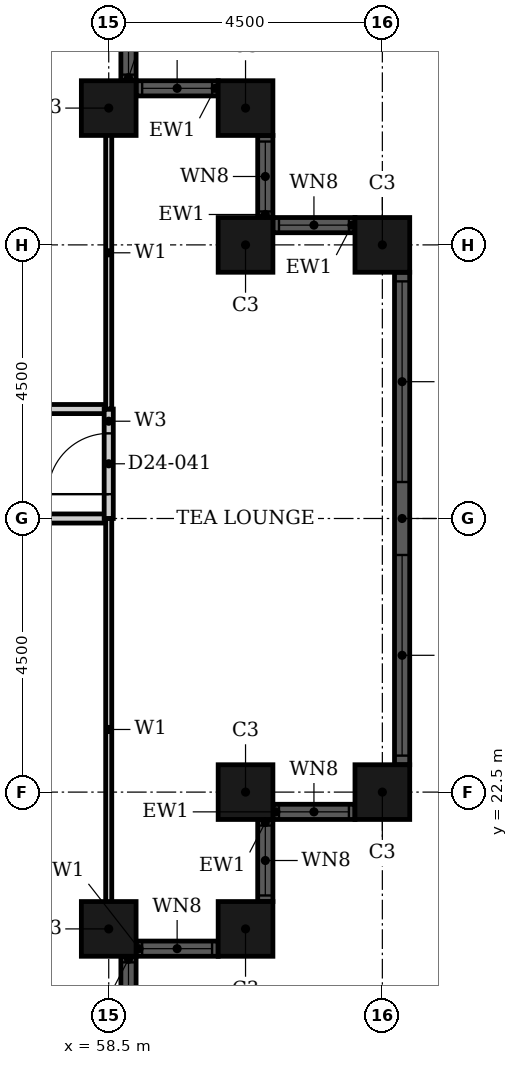
"""IFC4 building model, lengths in metres.
Left out: names, types, materials, properties, quantities, classifications, styles, units other than length and angle.
Written with IfcOpenShell. Run it as: python <this file> out.ifc"""

import sys

from ifc_helpers import new_model, si_unit, direction, frame, frame_2d, origin, origin_2d, place, context, subcontext, project, spatial, rectangle, hollow_rectangle, extrude, element, fill, save


model = new_model("IFC4")
c1 = context("Model", 3, precision=1e-05, world=origin(), true_north=direction((0.0, 1.0)))
c2 = subcontext(c1, "Body", "Model", "MODEL_VIEW")
j1 = project(units=[si_unit("LENGTHUNIT", "METRE"), si_unit("PLANEANGLEUNIT", "RADIAN")], contexts=[c1])
p1 = place(None, origin())
s1 = spatial("IfcSite", under=j1, at=p1, CompositionType="ELEMENT")
p2 = place(p1, origin())
s2 = spatial("IfcBuilding", under=s1, at=p2, CompositionType="ELEMENT")
p3 = place(p2, frame((0.0, 0.0, 100.8)))
s3 = spatial("IfcBuildingStorey", under=s2, at=p3, CompositionType="ELEMENT", Elevation=100.8)
for number, where, z_axis, x_axis in (
    (1, (58.5, 20.25, 0.0), (0.0, 0.0, 1.0), (1.0, 0.0, 0.0)),
    (2, (60.75, 20.25, 0.0), (0.0, 0.0, 1.0), (1.0, 0.0, 0.0)),
    (3, (60.75, 22.5, 0.0), (0.0, 0.0, 1.0), (1.0, 0.0, 0.0)),
    (4, (63.0, 22.5, 0.0), (0.0, 0.0, 1.0), (1.0, 0.0, 0.0)),
    (5, (63.0, 31.5, 0.0), (0.0, 0.0, 1.0), (1.0, 0.0, 0.0)),
    (6, (60.75, 31.5, 0.0), (0.0, 0.0, 1.0), (1.0, 0.0, 0.0)),
    (7, (60.75, 33.75, 0.0), (0.0, 0.0, 1.0), (1.0, 0.0, 0.0)),
    (8, (58.5, 33.75, 0.0), (0.0, 0.0, 1.0), (1.0, 0.0, 0.0)),
):
    element("IfcColumn", number, at=place(p3, frame(where, z_axis=z_axis, x_axis=x_axis)), inside=s3, PredefinedType="COLUMN", context=c2, shape_type="SweptSolid", body=[
        extrude(hollow_rectangle(XDim=0.9, YDim=0.9, WallThickness=0.028, at=origin_2d()), origin(), (0.0, 0.0, 1.0), 3.6),
    ])
p4 = place(p3, frame((58.825, 18.45, 0.0), z_axis=(0.0, 0.0, 1.0), x_axis=(0.0, 1.0, 0.0)))
e9 = element("IfcWall", 9, at=p4, inside=s3, PredefinedType="SOLIDWALL", context=c2, shape_type="SweptSolid", body=[
    extrude(rectangle(XDim=1.35, YDim=0.25, at=frame_2d((0.675, 0.0))), origin(), (0.0, 0.0, 1.0), 3.6),
])
p5 = place(p4, frame((0.1, 0.0, 0.9)))
e10 = element("IfcOpeningElement", 10, at=p5, cuts=e9, PredefinedType="OPENING", context=c2, shape_type="SweptSolid", body=[
    extrude(rectangle(XDim=1.15, YDim=2.08, at=frame_2d((0.575, 1.04))), frame((0.0, 0.135, 0.0), z_axis=(0.0, -1.0, 0.0), x_axis=(1.0, 0.0, 0.0)), (0.0, 0.0, 1.0), 0.27),
])
p6 = place(p3, frame((58.95, 19.925, 0.0), z_axis=(0.0, 0.0, 1.0), x_axis=(1.0, 0.0, 0.0)))
e11 = element("IfcWall", 11, at=p6, inside=s3, PredefinedType="SOLIDWALL", context=c2, shape_type="SweptSolid", body=[
    extrude(rectangle(XDim=1.35, YDim=0.25, at=frame_2d((0.675, 0.0))), origin(), (0.0, 0.0, 1.0), 3.6),
])
p7 = place(p6, frame((0.1, 0.0, 0.9)))
e12 = element("IfcOpeningElement", 12, at=p7, cuts=e11, PredefinedType="OPENING", context=c2, shape_type="SweptSolid", body=[
    extrude(rectangle(XDim=1.15, YDim=2.08, at=frame_2d((0.575, 1.04))), frame((0.0, 0.135, 0.0), z_axis=(0.0, -1.0, 0.0), x_axis=(1.0, 0.0, 0.0)), (0.0, 0.0, 1.0), 0.27),
])
p8 = place(p3, frame((61.075, 20.7, 0.0), z_axis=(0.0, 0.0, 1.0), x_axis=(0.0, 1.0, 0.0)))
e13 = element("IfcWall", 13, at=p8, inside=s3, PredefinedType="SOLIDWALL", context=c2, shape_type="SweptSolid", body=[
    extrude(rectangle(XDim=1.35, YDim=0.25, at=frame_2d((0.675, 0.0))), origin(), (0.0, 0.0, 1.0), 3.6),
])
p9 = place(p8, frame((0.1, 0.0, 0.9)))
e14 = element("IfcOpeningElement", 14, at=p9, cuts=e13, PredefinedType="OPENING", context=c2, shape_type="SweptSolid", body=[
    extrude(rectangle(XDim=1.15, YDim=2.08, at=frame_2d((0.575, 1.04))), frame((0.0, 0.135, 0.0), z_axis=(0.0, -1.0, 0.0), x_axis=(1.0, 0.0, 0.0)), (0.0, 0.0, 1.0), 0.27),
])
p10 = place(p3, frame((61.2, 22.175, 0.0), z_axis=(0.0, 0.0, 1.0), x_axis=(1.0, 0.0, 0.0)))
e15 = element("IfcWall", 15, at=p10, inside=s3, PredefinedType="SOLIDWALL", context=c2, shape_type="SweptSolid", body=[
    extrude(rectangle(XDim=1.35, YDim=0.25, at=frame_2d((0.675, 0.0))), origin(), (0.0, 0.0, 1.0), 3.6),
])
p11 = place(p10, frame((0.1, 0.0, 0.9)))
e16 = element("IfcOpeningElement", 16, at=p11, cuts=e15, PredefinedType="OPENING", context=c2, shape_type="SweptSolid", body=[
    extrude(rectangle(XDim=1.15, YDim=2.08, at=frame_2d((0.575, 1.04))), frame((0.0, 0.135, 0.0), z_axis=(0.0, -1.0, 0.0), x_axis=(1.0, 0.0, 0.0)), (0.0, 0.0, 1.0), 0.27),
])
p12 = place(p3, frame((63.325, 22.95, 0.0), z_axis=(0.0, 0.0, 1.0), x_axis=(0.0, 1.0, 0.0)))
e17 = element("IfcWall", 17, at=p12, inside=s3, PredefinedType="SOLIDWALL", context=c2, shape_type="SweptSolid", body=[
    extrude(rectangle(XDim=8.1, YDim=0.25, at=frame_2d((4.05, 0.0))), origin(), (0.0, 0.0, 1.0), 3.6),
])
p13 = place(p12, frame((0.15, 0.0, 0.9)))
e18 = element("IfcOpeningElement", 18, at=p13, cuts=e17, PredefinedType="OPENING", context=c2, shape_type="SweptSolid", body=[
    extrude(rectangle(XDim=3.3, YDim=2.08, at=frame_2d((1.65, 1.04))), frame((0.0, 0.135, 0.0), z_axis=(0.0, -1.0, 0.0), x_axis=(1.0, 0.0, 0.0)), (0.0, 0.0, 1.0), 0.27),
])
p14 = place(p12, frame((4.65, 0.0, 0.9)))
e19 = element("IfcOpeningElement", 19, at=p14, cuts=e17, PredefinedType="OPENING", context=c2, shape_type="SweptSolid", body=[
    extrude(rectangle(XDim=3.3, YDim=2.08, at=frame_2d((1.65, 1.04))), frame((0.0, 0.135, 0.0), z_axis=(0.0, -1.0, 0.0), x_axis=(1.0, 0.0, 0.0)), (0.0, 0.0, 1.0), 0.27),
])
p15 = place(p3, frame((62.55, 31.825, 0.0), z_axis=(0.0, 0.0, 1.0), x_axis=(-1.0, 0.0, 0.0)))
e20 = element("IfcWall", 20, at=p15, inside=s3, PredefinedType="SOLIDWALL", context=c2, shape_type="SweptSolid", body=[
    extrude(rectangle(XDim=1.35, YDim=0.25, at=frame_2d((0.675, 0.0))), origin(), (0.0, 0.0, 1.0), 3.6),
])
p16 = place(p15, frame((0.1, 0.0, 0.9)))
e21 = element("IfcOpeningElement", 21, at=p16, cuts=e20, PredefinedType="OPENING", context=c2, shape_type="SweptSolid", body=[
    extrude(rectangle(XDim=1.15, YDim=2.08, at=frame_2d((0.575, 1.04))), frame((0.0, 0.135, 0.0), z_axis=(0.0, -1.0, 0.0), x_axis=(1.0, 0.0, 0.0)), (0.0, 0.0, 1.0), 0.27),
])
p17 = place(p3, frame((61.075, 31.95, 0.0), z_axis=(0.0, 0.0, 1.0), x_axis=(0.0, 1.0, 0.0)))
e22 = element("IfcWall", 22, at=p17, inside=s3, PredefinedType="SOLIDWALL", context=c2, shape_type="SweptSolid", body=[
    extrude(rectangle(XDim=1.35, YDim=0.25, at=frame_2d((0.675, 0.0))), origin(), (0.0, 0.0, 1.0), 3.6),
])
p18 = place(p17, frame((0.1, 0.0, 0.9)))
e23 = element("IfcOpeningElement", 23, at=p18, cuts=e22, PredefinedType="OPENING", context=c2, shape_type="SweptSolid", body=[
    extrude(rectangle(XDim=1.15, YDim=2.08, at=frame_2d((0.575, 1.04))), frame((0.0, 0.135, 0.0), z_axis=(0.0, -1.0, 0.0), x_axis=(1.0, 0.0, 0.0)), (0.0, 0.0, 1.0), 0.27),
])
p19 = place(p3, frame((60.3, 34.075, 0.0), z_axis=(0.0, 0.0, 1.0), x_axis=(-1.0, 0.0, 0.0)))
e24 = element("IfcWall", 24, at=p19, inside=s3, PredefinedType="SOLIDWALL", context=c2, shape_type="SweptSolid", body=[
    extrude(rectangle(XDim=1.35, YDim=0.25, at=frame_2d((0.675, 0.0))), origin(), (0.0, 0.0, 1.0), 3.6),
])
p20 = place(p19, frame((0.1, 0.0, 0.9)))
e25 = element("IfcOpeningElement", 25, at=p20, cuts=e24, PredefinedType="OPENING", context=c2, shape_type="SweptSolid", body=[
    extrude(rectangle(XDim=1.15, YDim=2.08, at=frame_2d((0.575, 1.04))), frame((0.0, 0.135, 0.0), z_axis=(0.0, -1.0, 0.0), x_axis=(1.0, 0.0, 0.0)), (0.0, 0.0, 1.0), 0.27),
])
p21 = place(p3, frame((58.825, 34.2, 0.0), z_axis=(0.0, 0.0, 1.0), x_axis=(0.0, 1.0, 0.0)))
e26 = element("IfcWall", 26, at=p21, inside=s3, PredefinedType="SOLIDWALL", context=c2, shape_type="SweptSolid", body=[
    extrude(rectangle(XDim=1.35, YDim=0.25, at=frame_2d((0.675, 0.0))), origin(), (0.0, 0.0, 1.0), 3.6),
])
p22 = place(p21, frame((0.1, 0.0, 0.9)))
e27 = element("IfcOpeningElement", 27, at=p22, cuts=e26, PredefinedType="OPENING", context=c2, shape_type="SweptSolid", body=[
    extrude(rectangle(XDim=1.15, YDim=2.08, at=frame_2d((0.575, 1.04))), frame((0.0, 0.135, 0.0), z_axis=(0.0, -1.0, 0.0), x_axis=(1.0, 0.0, 0.0)), (0.0, 0.0, 1.0), 0.27),
])
p23 = place(p3, frame((46.8, 27.0, 0.0), z_axis=(0.0, 0.0, 1.0), x_axis=(1.0, 0.0, 0.0)))
e28 = element("IfcWall", 28, at=p23, inside=s3, PredefinedType="PARTITIONING", context=c2, shape_type="SweptSolid", body=[
    extrude(rectangle(XDim=11.7, YDim=0.15, at=frame_2d((5.85, 0.0))), origin(), (0.0, 0.0, 1.0), 2.58),
])
p24 = place(p23, frame((4.45, 0.0, 0.0)))
e29 = element("IfcOpeningElement", 29, at=p24, cuts=e28, PredefinedType="OPENING", context=c2, shape_type="SweptSolid", body=[
    extrude(rectangle(XDim=1.0, YDim=2.1, at=frame_2d((0.5, 1.05))), frame((0.0, 0.085, 0.0), z_axis=(0.0, -1.0, 0.0), x_axis=(1.0, 0.0, 0.0)), (0.0, 0.0, 1.0), 0.17),
])
p25 = place(p3, frame((46.8, 28.8, 0.0), z_axis=(0.0, 0.0, 1.0), x_axis=(1.0, 0.0, 0.0)))
e30 = element("IfcWall", 30, at=p25, inside=s3, PredefinedType="PARTITIONING", context=c2, shape_type="SweptSolid", body=[
    extrude(rectangle(XDim=11.7, YDim=0.15, at=frame_2d((5.85, 0.0))), origin(), (0.0, 0.0, 1.0), 3.3),
])
p26 = place(p25, frame((4.45, 0.0, 0.0)))
e31 = element("IfcOpeningElement", 31, at=p26, cuts=e30, PredefinedType="OPENING", context=c2, shape_type="SweptSolid", body=[
    extrude(rectangle(XDim=1.0, YDim=2.1, at=frame_2d((0.5, 1.05))), frame((0.0, 0.085, 0.0), z_axis=(0.0, -1.0, 0.0), x_axis=(1.0, 0.0, 0.0)), (0.0, 0.0, 1.0), 0.17),
])
p27 = place(p3, frame((58.5, 27.0, 0.0), z_axis=(0.0, 0.0, 1.0), x_axis=(0.0, 1.0, 0.0)))
e32 = element("IfcWall", 32, at=p27, inside=s3, PredefinedType="PARTITIONING", context=c2, shape_type="SweptSolid", body=[
    extrude(rectangle(XDim=1.8, YDim=0.15, at=frame_2d((0.9, 0.0))), origin(), (0.0, 0.0, 1.0), 3.3),
])
p28 = place(p27, frame((0.4, 0.0, 0.0)))
e33 = element("IfcOpeningElement", 33, at=p28, cuts=e32, PredefinedType="OPENING", context=c2, shape_type="SweptSolid", body=[
    extrude(rectangle(XDim=1.0, YDim=2.1, at=frame_2d((0.5, 1.05))), frame((0.0, 0.085, 0.0), z_axis=(0.0, -1.0, 0.0), x_axis=(1.0, 0.0, 0.0)), (0.0, 0.0, 1.0), 0.17),
])
p29 = place(p3, frame((58.5, 28.8, 0.0), z_axis=(0.0, 0.0, 1.0), x_axis=(0.0, 1.0, 0.0)))
e34 = element("IfcWall", 34, at=p29, inside=s3, PredefinedType="PARTITIONING", context=c2, shape_type="SweptSolid", body=[
    extrude(rectangle(XDim=5.14, YDim=0.1, at=frame_2d((2.57, 0.0))), origin(), (0.0, 0.0, 1.0), 3.3),
])
p30 = place(p3, frame((58.5, 20.06, 0.0), z_axis=(0.0, 0.0, 1.0), x_axis=(0.0, 1.0, 0.0)))
e35 = element("IfcWall", 35, at=p30, inside=s3, PredefinedType="PARTITIONING", context=c2, shape_type="SweptSolid", body=[
    extrude(rectangle(XDim=6.94, YDim=0.1, at=frame_2d((3.47, 0.0))), origin(), (0.0, 0.0, 1.0), 3.3),
])
p31 = place(p5, origin())
e36 = element("IfcWindow", 36, at=p31, inside=s3, PartitioningType="SINGLE_PANEL", PredefinedType="WINDOW", context=c2, shape_type="SweptSolid", body=[
    extrude(rectangle(XDim=1.15, YDim=2.08, at=frame_2d((0.575, 1.04))), frame((0.0, 0.03, 0.0), z_axis=(0.0, -1.0, 0.0), x_axis=(1.0, 0.0, 0.0)), (0.0, 0.0, 1.0), 0.06),
])
fill(e10, e36)
p32 = place(p7, origin())
e37 = element("IfcWindow", 37, at=p32, inside=s3, PartitioningType="SINGLE_PANEL", PredefinedType="WINDOW", context=c2, shape_type="SweptSolid", body=[
    extrude(rectangle(XDim=1.15, YDim=2.08, at=frame_2d((0.575, 1.04))), frame((0.0, 0.03, 0.0), z_axis=(0.0, -1.0, 0.0), x_axis=(1.0, 0.0, 0.0)), (0.0, 0.0, 1.0), 0.06),
])
fill(e12, e37)
p33 = place(p9, origin())
e38 = element("IfcWindow", 38, at=p33, inside=s3, PartitioningType="SINGLE_PANEL", PredefinedType="WINDOW", context=c2, shape_type="SweptSolid", body=[
    extrude(rectangle(XDim=1.15, YDim=2.08, at=frame_2d((0.575, 1.04))), frame((0.0, 0.03, 0.0), z_axis=(0.0, -1.0, 0.0), x_axis=(1.0, 0.0, 0.0)), (0.0, 0.0, 1.0), 0.06),
])
fill(e14, e38)
p34 = place(p11, origin())
e39 = element("IfcWindow", 39, at=p34, inside=s3, PartitioningType="SINGLE_PANEL", PredefinedType="WINDOW", context=c2, shape_type="SweptSolid", body=[
    extrude(rectangle(XDim=1.15, YDim=2.08, at=frame_2d((0.575, 1.04))), frame((0.0, 0.03, 0.0), z_axis=(0.0, -1.0, 0.0), x_axis=(1.0, 0.0, 0.0)), (0.0, 0.0, 1.0), 0.06),
])
fill(e16, e39)
p35 = place(p13, origin())
e40 = element("IfcWindow", 40, at=p35, inside=s3, PartitioningType="SINGLE_PANEL", PredefinedType="WINDOW", context=c2, shape_type="SweptSolid", body=[
    extrude(rectangle(XDim=3.3, YDim=2.08, at=frame_2d((1.65, 1.04))), frame((0.0, 0.03, 0.0), z_axis=(0.0, -1.0, 0.0), x_axis=(1.0, 0.0, 0.0)), (0.0, 0.0, 1.0), 0.06),
])
fill(e18, e40)
p36 = place(p14, origin())
e41 = element("IfcWindow", 41, at=p36, inside=s3, PartitioningType="SINGLE_PANEL", PredefinedType="WINDOW", context=c2, shape_type="SweptSolid", body=[
    extrude(rectangle(XDim=3.3, YDim=2.08, at=frame_2d((1.65, 1.04))), frame((0.0, 0.03, 0.0), z_axis=(0.0, -1.0, 0.0), x_axis=(1.0, 0.0, 0.0)), (0.0, 0.0, 1.0), 0.06),
])
fill(e19, e41)
p37 = place(p16, origin())
e42 = element("IfcWindow", 42, at=p37, inside=s3, PartitioningType="SINGLE_PANEL", PredefinedType="WINDOW", context=c2, shape_type="SweptSolid", body=[
    extrude(rectangle(XDim=1.15, YDim=2.08, at=frame_2d((0.575, 1.04))), frame((0.0, 0.03, 0.0), z_axis=(0.0, -1.0, 0.0), x_axis=(1.0, 0.0, 0.0)), (0.0, 0.0, 1.0), 0.06),
])
fill(e21, e42)
p38 = place(p18, origin())
e43 = element("IfcWindow", 43, at=p38, inside=s3, PartitioningType="SINGLE_PANEL", PredefinedType="WINDOW", context=c2, shape_type="SweptSolid", body=[
    extrude(rectangle(XDim=1.15, YDim=2.08, at=frame_2d((0.575, 1.04))), frame((0.0, 0.03, 0.0), z_axis=(0.0, -1.0, 0.0), x_axis=(1.0, 0.0, 0.0)), (0.0, 0.0, 1.0), 0.06),
])
fill(e23, e43)
p39 = place(p20, origin())
e44 = element("IfcWindow", 44, at=p39, inside=s3, PartitioningType="SINGLE_PANEL", PredefinedType="WINDOW", context=c2, shape_type="SweptSolid", body=[
    extrude(rectangle(XDim=1.15, YDim=2.08, at=frame_2d((0.575, 1.04))), frame((0.0, 0.03, 0.0), z_axis=(0.0, -1.0, 0.0), x_axis=(1.0, 0.0, 0.0)), (0.0, 0.0, 1.0), 0.06),
])
fill(e25, e44)
p40 = place(p22, origin())
e45 = element("IfcWindow", 45, at=p40, inside=s3, PartitioningType="SINGLE_PANEL", PredefinedType="WINDOW", context=c2, shape_type="SweptSolid", body=[
    extrude(rectangle(XDim=1.15, YDim=2.08, at=frame_2d((0.575, 1.04))), frame((0.0, 0.03, 0.0), z_axis=(0.0, -1.0, 0.0), x_axis=(1.0, 0.0, 0.0)), (0.0, 0.0, 1.0), 0.06),
])
fill(e27, e45)
p41 = place(p28, origin())
e46 = element("IfcDoor", 46, at=p41, inside=s3, OperationType="SINGLE_SWING_LEFT", PredefinedType="DOOR", context=c2, shape_type="SweptSolid", body=[
    extrude(rectangle(XDim=1.0, YDim=2.1, at=frame_2d((0.5, 1.05))), frame((0.0, 0.025, 0.0), z_axis=(0.0, -1.0, 0.0), x_axis=(1.0, 0.0, 0.0)), (0.0, 0.0, 1.0), 0.05),
])
fill(e33, e46)
save(model, sys.argv[1])
